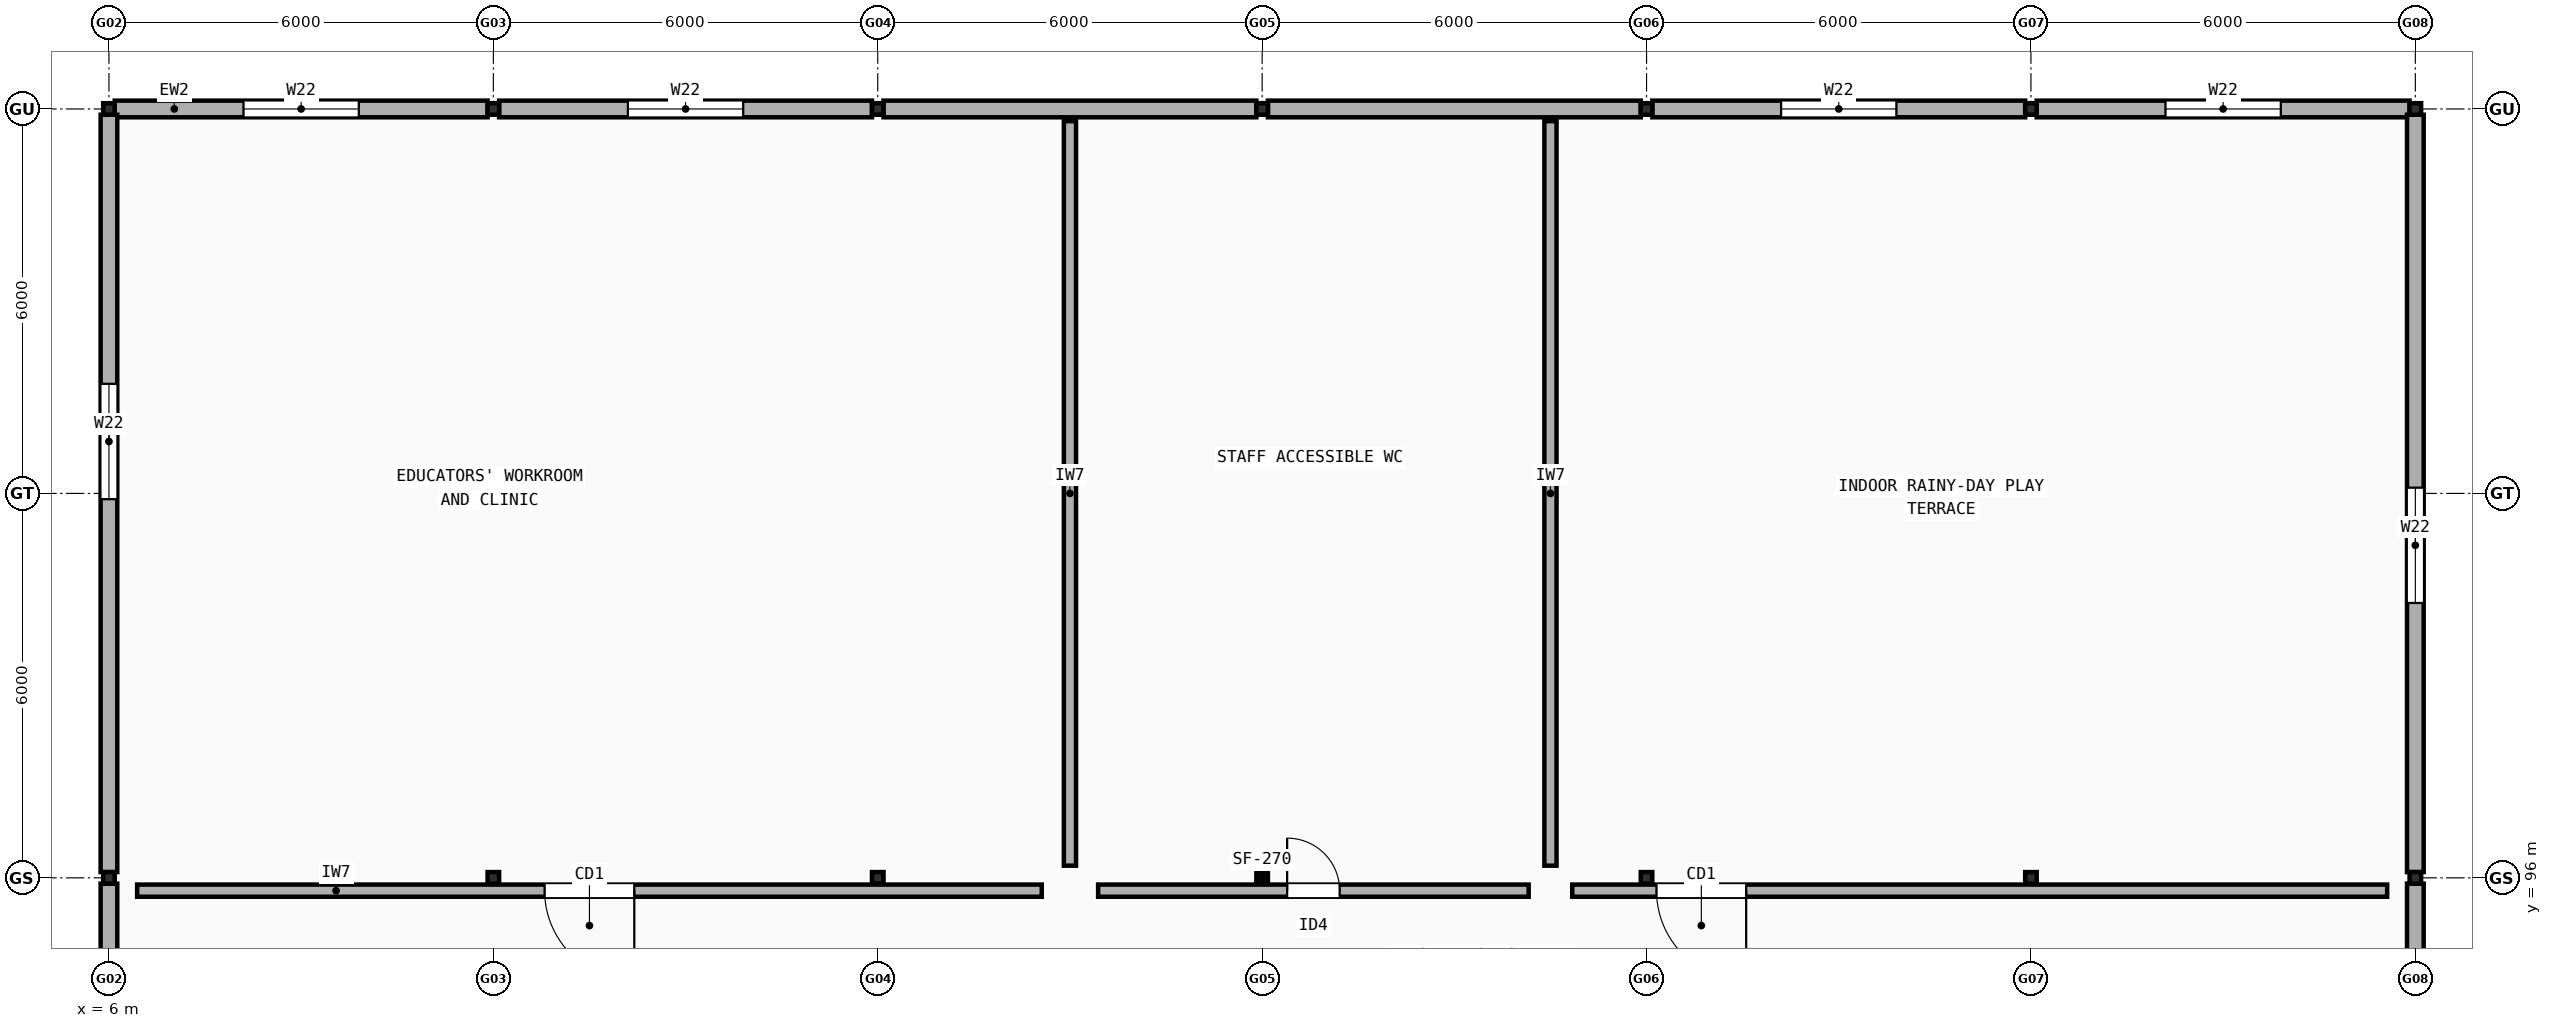
"""IFC4 building model, lengths in metres.
Left out: names, types, materials, properties, quantities, classifications, styles, units other than length and angle.
Written with IfcOpenShell. Run it as: python <this file> out.ifc"""

import sys

from ifc_helpers import new_model, si_unit, direction, frame, frame_2d, origin, origin_2d, place, context, subcontext, project, spatial, rectangle, hollow_rectangle, extrude, element, fill, save


model = new_model("IFC4")
c1 = context("Model", 3, precision=1e-05, world=origin(), true_north=direction((0.0, 1.0)))
c2 = subcontext(c1, "Body", "Model", "MODEL_VIEW")
j1 = project(units=[si_unit("LENGTHUNIT", "METRE"), si_unit("PLANEANGLEUNIT", "RADIAN")], contexts=[c1])
p1 = place(None, origin())
s1 = spatial("IfcSite", under=j1, at=p1, CompositionType="ELEMENT")
p2 = place(p1, origin())
s2 = spatial("IfcBuilding", under=s1, at=p2, CompositionType="ELEMENT")
p3 = place(p2, frame((0.0, 0.0, 4.5)))
s3 = spatial("IfcBuildingStorey", under=s2, at=p3, CompositionType="ELEMENT", Elevation=4.5)
p4 = place(p3, frame((6.0, 96.0, 0.0), z_axis=(0.0, 0.0, 1.0), x_axis=(1.0, 0.0, 0.0)))
e1 = element("IfcColumn", 1, at=p4, inside=s3, PredefinedType="COLUMN", context=c2, shape_type="SweptSolid", body=[
    extrude(hollow_rectangle(XDim=0.18, YDim=0.18, WallThickness=0.01, InnerFilletRadius=0.01, OuterFilletRadius=0.02, at=origin_2d()), origin(), (0.0, 0.0, 1.0), 5.276),
])
p5 = place(p3, frame((6.0, 108.0, 0.0), z_axis=(0.0, 0.0, 1.0), x_axis=(1.0, 0.0, 0.0)))
e2 = element("IfcColumn", 2, at=p5, inside=s3, PredefinedType="COLUMN", context=c2, shape_type="SweptSolid", body=[
    extrude(hollow_rectangle(XDim=0.18, YDim=0.18, WallThickness=0.01, InnerFilletRadius=0.01, OuterFilletRadius=0.02, at=origin_2d()), origin(), (0.0, 0.0, 1.0), 7.392),
])
p6 = place(p3, frame((12.0, 96.0, 0.0), z_axis=(0.0, 0.0, 1.0), x_axis=(1.0, 0.0, 0.0)))
e3 = element("IfcColumn", 3, at=p6, inside=s3, PredefinedType="COLUMN", context=c2, shape_type="SweptSolid", body=[
    extrude(hollow_rectangle(XDim=0.18, YDim=0.18, WallThickness=0.01, InnerFilletRadius=0.01, OuterFilletRadius=0.02, at=origin_2d()), origin(), (0.0, 0.0, 1.0), 5.276),
])
p7 = place(p3, frame((12.0, 108.0, 0.0), z_axis=(0.0, 0.0, 1.0), x_axis=(1.0, 0.0, 0.0)))
e4 = element("IfcColumn", 4, at=p7, inside=s3, PredefinedType="COLUMN", context=c2, shape_type="SweptSolid", body=[
    extrude(hollow_rectangle(XDim=0.18, YDim=0.18, WallThickness=0.01, InnerFilletRadius=0.01, OuterFilletRadius=0.02, at=origin_2d()), origin(), (0.0, 0.0, 1.0), 7.392),
])
p8 = place(p3, frame((18.0, 96.0, 0.0), z_axis=(0.0, 0.0, 1.0), x_axis=(1.0, 0.0, 0.0)))
e5 = element("IfcColumn", 5, at=p8, inside=s3, PredefinedType="COLUMN", context=c2, shape_type="SweptSolid", body=[
    extrude(hollow_rectangle(XDim=0.18, YDim=0.18, WallThickness=0.01, InnerFilletRadius=0.01, OuterFilletRadius=0.02, at=origin_2d()), origin(), (0.0, 0.0, 1.0), 5.276),
])
p9 = place(p3, frame((18.0, 108.0, 0.0), z_axis=(0.0, 0.0, 1.0), x_axis=(1.0, 0.0, 0.0)))
e6 = element("IfcColumn", 6, at=p9, inside=s3, PredefinedType="COLUMN", context=c2, shape_type="SweptSolid", body=[
    extrude(hollow_rectangle(XDim=0.18, YDim=0.18, WallThickness=0.01, InnerFilletRadius=0.01, OuterFilletRadius=0.02, at=origin_2d()), origin(), (0.0, 0.0, 1.0), 7.392),
])
p10 = place(p3, frame((24.0, 96.0, 0.0), z_axis=(0.0, 0.0, 1.0), x_axis=(1.0, 0.0, 0.0)))
e7 = element("IfcColumn", 7, at=p10, inside=s3, PredefinedType="COLUMN", context=c2, shape_type="SweptSolid", body=[
    extrude(hollow_rectangle(XDim=0.18, YDim=0.18, WallThickness=0.01, InnerFilletRadius=0.01, OuterFilletRadius=0.02, at=origin_2d()), origin(), (0.0, 0.0, 1.0), 5.276),
])
p11 = place(p3, frame((24.0, 108.0, 0.0), z_axis=(0.0, 0.0, 1.0), x_axis=(1.0, 0.0, 0.0)))
e8 = element("IfcColumn", 8, at=p11, inside=s3, PredefinedType="COLUMN", context=c2, shape_type="SweptSolid", body=[
    extrude(hollow_rectangle(XDim=0.18, YDim=0.18, WallThickness=0.01, InnerFilletRadius=0.01, OuterFilletRadius=0.02, at=origin_2d()), origin(), (0.0, 0.0, 1.0), 7.392),
])
p12 = place(p3, frame((30.0, 96.0, 0.0), z_axis=(0.0, 0.0, 1.0), x_axis=(1.0, 0.0, 0.0)))
e9 = element("IfcColumn", 9, at=p12, inside=s3, PredefinedType="COLUMN", context=c2, shape_type="SweptSolid", body=[
    extrude(hollow_rectangle(XDim=0.18, YDim=0.18, WallThickness=0.01, InnerFilletRadius=0.01, OuterFilletRadius=0.02, at=origin_2d()), origin(), (0.0, 0.0, 1.0), 5.276),
])
p13 = place(p3, frame((30.0, 108.0, 0.0), z_axis=(0.0, 0.0, 1.0), x_axis=(1.0, 0.0, 0.0)))
e10 = element("IfcColumn", 10, at=p13, inside=s3, PredefinedType="COLUMN", context=c2, shape_type="SweptSolid", body=[
    extrude(hollow_rectangle(XDim=0.18, YDim=0.18, WallThickness=0.01, InnerFilletRadius=0.01, OuterFilletRadius=0.02, at=origin_2d()), origin(), (0.0, 0.0, 1.0), 7.392),
])
p14 = place(p3, frame((36.0, 96.0, 0.0), z_axis=(0.0, 0.0, 1.0), x_axis=(1.0, 0.0, 0.0)))
e11 = element("IfcColumn", 11, at=p14, inside=s3, PredefinedType="COLUMN", context=c2, shape_type="SweptSolid", body=[
    extrude(hollow_rectangle(XDim=0.18, YDim=0.18, WallThickness=0.01, InnerFilletRadius=0.01, OuterFilletRadius=0.02, at=origin_2d()), origin(), (0.0, 0.0, 1.0), 5.276),
])
p15 = place(p3, frame((36.0, 108.0, 0.0), z_axis=(0.0, 0.0, 1.0), x_axis=(1.0, 0.0, 0.0)))
e12 = element("IfcColumn", 12, at=p15, inside=s3, PredefinedType="COLUMN", context=c2, shape_type="SweptSolid", body=[
    extrude(hollow_rectangle(XDim=0.18, YDim=0.18, WallThickness=0.01, InnerFilletRadius=0.01, OuterFilletRadius=0.02, at=origin_2d()), origin(), (0.0, 0.0, 1.0), 7.392),
])
p16 = place(p3, frame((42.0, 96.0, 0.0), z_axis=(0.0, 0.0, 1.0), x_axis=(1.0, 0.0, 0.0)))
e13 = element("IfcColumn", 13, at=p16, inside=s3, PredefinedType="COLUMN", context=c2, shape_type="SweptSolid", body=[
    extrude(hollow_rectangle(XDim=0.18, YDim=0.18, WallThickness=0.01, InnerFilletRadius=0.01, OuterFilletRadius=0.02, at=origin_2d()), origin(), (0.0, 0.0, 1.0), 5.276),
])
p17 = place(p3, frame((42.0, 108.0, 0.0), z_axis=(0.0, 0.0, 1.0), x_axis=(1.0, 0.0, 0.0)))
e14 = element("IfcColumn", 14, at=p17, inside=s3, PredefinedType="COLUMN", context=c2, shape_type="SweptSolid", body=[
    extrude(hollow_rectangle(XDim=0.18, YDim=0.18, WallThickness=0.01, InnerFilletRadius=0.01, OuterFilletRadius=0.02, at=origin_2d()), origin(), (0.0, 0.0, 1.0), 7.392),
])
p18 = place(p3, frame((11.91, 108.0, 0.0), z_axis=(0.0, 0.0, 1.0), x_axis=(-1.0, 0.0, 0.0)))
e15 = element("IfcWall", 15, at=p18, inside=s3, PredefinedType="STANDARD", context=c2, shape_type="SweptSolid", body=[
    extrude(rectangle(XDim=5.82, YDim=0.26, at=frame_2d((2.91, 0.0))), origin(), (0.0, 0.0, 1.0), 2.7),
])
p19 = place(p18, frame((2.01, 0.0, 0.85)))
e16 = element("IfcOpeningElement", 16, at=p19, cuts=e15, PredefinedType="OPENING", context=c2, shape_type="SweptSolid", body=[
    extrude(rectangle(XDim=1.8, YDim=1.45, at=frame_2d((0.9, 0.725))), frame((0.0, 0.14, 0.0), z_axis=(0.0, -1.0, 0.0), x_axis=(1.0, 0.0, 0.0)), (0.0, 0.0, 1.0), 0.28),
])
p20 = place(p3, frame((17.91, 108.0, 0.0), z_axis=(0.0, 0.0, 1.0), x_axis=(-1.0, 0.0, 0.0)))
e17 = element("IfcWall", 17, at=p20, inside=s3, PredefinedType="STANDARD", context=c2, shape_type="SweptSolid", body=[
    extrude(rectangle(XDim=5.82, YDim=0.26, at=frame_2d((2.91, 0.0))), origin(), (0.0, 0.0, 1.0), 2.7),
])
p21 = place(p20, frame((2.01, 0.0, 0.85)))
e18 = element("IfcOpeningElement", 18, at=p21, cuts=e17, PredefinedType="OPENING", context=c2, shape_type="SweptSolid", body=[
    extrude(rectangle(XDim=1.8, YDim=1.45, at=frame_2d((0.9, 0.725))), frame((0.0, 0.14, 0.0), z_axis=(0.0, -1.0, 0.0), x_axis=(1.0, 0.0, 0.0)), (0.0, 0.0, 1.0), 0.28),
])
for number, where, z_axis, x_axis in (
    (19, (23.91, 108.0, 0.0), (0.0, 0.0, 1.0), (-1.0, 0.0, 0.0)),
    (20, (29.91, 108.0, 0.0), (0.0, 0.0, 1.0), (-1.0, 0.0, 0.0)),
):
    element("IfcWall", number, at=place(p3, frame(where, z_axis=z_axis, x_axis=x_axis)), inside=s3, PredefinedType="STANDARD", context=c2, shape_type="SweptSolid", body=[
        extrude(rectangle(XDim=5.82, YDim=0.26, at=frame_2d((2.91, 0.0))), origin(), (0.0, 0.0, 1.0), 2.7),
    ])
p22 = place(p3, frame((35.91, 108.0, 0.0), z_axis=(0.0, 0.0, 1.0), x_axis=(-1.0, 0.0, 0.0)))
e21 = element("IfcWall", 21, at=p22, inside=s3, PredefinedType="STANDARD", context=c2, shape_type="SweptSolid", body=[
    extrude(rectangle(XDim=5.82, YDim=0.26, at=frame_2d((2.91, 0.0))), origin(), (0.0, 0.0, 1.0), 2.7),
])
p23 = place(p22, frame((2.01, 0.0, 0.85)))
e22 = element("IfcOpeningElement", 22, at=p23, cuts=e21, PredefinedType="OPENING", context=c2, shape_type="SweptSolid", body=[
    extrude(rectangle(XDim=1.8, YDim=1.45, at=frame_2d((0.9, 0.725))), frame((0.0, 0.14, 0.0), z_axis=(0.0, -1.0, 0.0), x_axis=(1.0, 0.0, 0.0)), (0.0, 0.0, 1.0), 0.28),
])
p24 = place(p3, frame((41.91, 108.0, 0.0), z_axis=(0.0, 0.0, 1.0), x_axis=(-1.0, 0.0, 0.0)))
e23 = element("IfcWall", 23, at=p24, inside=s3, PredefinedType="STANDARD", context=c2, shape_type="SweptSolid", body=[
    extrude(rectangle(XDim=5.82, YDim=0.26, at=frame_2d((2.91, 0.0))), origin(), (0.0, 0.0, 1.0), 2.7),
])
p25 = place(p24, frame((2.01, 0.0, 0.85)))
e24 = element("IfcOpeningElement", 24, at=p25, cuts=e23, PredefinedType="OPENING", context=c2, shape_type="SweptSolid", body=[
    extrude(rectangle(XDim=1.8, YDim=1.45, at=frame_2d((0.9, 0.725))), frame((0.0, 0.14, 0.0), z_axis=(0.0, -1.0, 0.0), x_axis=(1.0, 0.0, 0.0)), (0.0, 0.0, 1.0), 0.28),
])
p26 = place(p3, frame((6.0, 95.91, 0.0), z_axis=(0.0, 0.0, 1.0), x_axis=(0.0, -1.0, 0.0)))
e25 = element("IfcWall", 25, at=p26, inside=s3, PredefinedType="STANDARD", context=c2, shape_type="SweptSolid", body=[
    extrude(rectangle(XDim=11.82, YDim=0.26, at=frame_2d((5.91, 0.0))), origin(), (0.0, 0.0, 1.0), 2.7),
])
p27 = place(p26, frame((4.2, 0.0, 0.85)))
e26 = element("IfcOpeningElement", 26, at=p27, cuts=e25, PredefinedType="OPENING", context=c2, shape_type="SweptSolid", body=[
    extrude(rectangle(XDim=1.8, YDim=1.45, at=frame_2d((0.9, 0.725))), frame((0.0, 0.14, 0.0), z_axis=(0.0, -1.0, 0.0), x_axis=(1.0, 0.0, 0.0)), (0.0, 0.0, 1.0), 0.28),
])
p28 = place(p3, frame((42.0, 84.09, 0.0), z_axis=(0.0, 0.0, 1.0), x_axis=(0.0, 1.0, 0.0)))
e27 = element("IfcWall", 27, at=p28, inside=s3, PredefinedType="STANDARD", context=c2, shape_type="SweptSolid", body=[
    extrude(rectangle(XDim=11.82, YDim=0.26, at=frame_2d((5.91, 0.0))), origin(), (0.0, 0.0, 1.0), 2.7),
])
p29 = place(p28, frame((4.2, 0.0, 0.85)))
e28 = element("IfcOpeningElement", 28, at=p29, cuts=e27, PredefinedType="OPENING", context=c2, shape_type="SweptSolid", body=[
    extrude(rectangle(XDim=1.8, YDim=1.45, at=frame_2d((0.9, 0.725))), frame((0.0, 0.14, 0.0), z_axis=(0.0, -1.0, 0.0), x_axis=(1.0, 0.0, 0.0)), (0.0, 0.0, 1.0), 0.28),
])
p30 = place(p3, frame((6.0, 107.91, 0.0), z_axis=(0.0, 0.0, 1.0), x_axis=(0.0, -1.0, 0.0)))
e29 = element("IfcWall", 29, at=p30, inside=s3, PredefinedType="STANDARD", context=c2, shape_type="SweptSolid", body=[
    extrude(rectangle(XDim=11.82, YDim=0.26, at=frame_2d((5.91, 0.0))), origin(), (0.0, 0.0, 1.0), 2.7),
])
p31 = place(p30, frame((4.2, 0.0, 0.85)))
e30 = element("IfcOpeningElement", 30, at=p31, cuts=e29, PredefinedType="OPENING", context=c2, shape_type="SweptSolid", body=[
    extrude(rectangle(XDim=1.8, YDim=1.45, at=frame_2d((0.9, 0.725))), frame((0.0, 0.14, 0.0), z_axis=(0.0, -1.0, 0.0), x_axis=(1.0, 0.0, 0.0)), (0.0, 0.0, 1.0), 0.28),
])
p32 = place(p3, frame((42.0, 96.09, 0.0), z_axis=(0.0, 0.0, 1.0), x_axis=(0.0, 1.0, 0.0)))
e31 = element("IfcWall", 31, at=p32, inside=s3, PredefinedType="STANDARD", context=c2, shape_type="SweptSolid", body=[
    extrude(rectangle(XDim=11.82, YDim=0.26, at=frame_2d((5.91, 0.0))), origin(), (0.0, 0.0, 1.0), 2.7),
])
p33 = place(p32, frame((4.2, 0.0, 0.85)))
e32 = element("IfcOpeningElement", 32, at=p33, cuts=e31, PredefinedType="OPENING", context=c2, shape_type="SweptSolid", body=[
    extrude(rectangle(XDim=1.8, YDim=1.45, at=frame_2d((0.9, 0.725))), frame((0.0, 0.14, 0.0), z_axis=(0.0, -1.0, 0.0), x_axis=(1.0, 0.0, 0.0)), (0.0, 0.0, 1.0), 0.28),
])
p34 = place(p3, frame((6.44, 95.8, 0.0), z_axis=(0.0, 0.0, 1.0), x_axis=(1.0, 0.0, 0.0)))
e33 = element("IfcWall", 33, at=p34, inside=s3, PredefinedType="SOLIDWALL", context=c2, shape_type="SweptSolid", body=[
    extrude(rectangle(XDim=14.12, YDim=0.19, at=frame_2d((7.06, 0.0))), origin(), (0.0, 0.0, 1.0), 2.872),
])
p35 = place(p34, frame((6.36, 0.0, 0.0)))
e34 = element("IfcOpeningElement", 34, at=p35, cuts=e33, PredefinedType="OPENING", context=c2, shape_type="SweptSolid", body=[
    extrude(rectangle(XDim=1.4, YDim=2.15, at=frame_2d((0.7, 1.075))), frame((0.0, 0.105, 0.0), z_axis=(0.0, -1.0, 0.0), x_axis=(1.0, 0.0, 0.0)), (0.0, 0.0, 1.0), 0.21),
])
p36 = place(p3, frame((21.0, 96.19, 0.0), z_axis=(0.0, 0.0, 1.0), x_axis=(0.0, 1.0, 0.0)))
e35 = element("IfcWall", 35, at=p36, inside=s3, PredefinedType="SOLIDWALL", context=c2, shape_type="SweptSolid", body=[
    extrude(rectangle(XDim=11.62, YDim=0.19, at=frame_2d((5.81, 0.0))), origin(), (0.0, 0.0, 1.0), 2.945),
])
p37 = place(p3, frame((21.44, 95.8, 0.0), z_axis=(0.0, 0.0, 1.0), x_axis=(1.0, 0.0, 0.0)))
e36 = element("IfcWall", 36, at=p37, inside=s3, PredefinedType="SOLIDWALL", context=c2, shape_type="SweptSolid", body=[
    extrude(rectangle(XDim=6.72, YDim=0.19, at=frame_2d((3.36, 0.0))), origin(), (0.0, 0.0, 1.0), 2.872),
])
p38 = place(p37, frame((2.95, 0.0, 0.0)))
e37 = element("IfcOpeningElement", 37, at=p38, cuts=e36, PredefinedType="OPENING", context=c2, shape_type="SweptSolid", body=[
    extrude(rectangle(XDim=0.82, YDim=2.08, at=frame_2d((0.41, 1.04))), frame((0.0, 0.105, 0.0), z_axis=(0.0, -1.0, 0.0), x_axis=(1.0, 0.0, 0.0)), (0.0, 0.0, 1.0), 0.21),
])
p39 = place(p3, frame((28.5, 96.19, 0.0), z_axis=(0.0, 0.0, 1.0), x_axis=(0.0, 1.0, 0.0)))
e38 = element("IfcWall", 38, at=p39, inside=s3, PredefinedType="SOLIDWALL", context=c2, shape_type="SweptSolid", body=[
    extrude(rectangle(XDim=11.62, YDim=0.19, at=frame_2d((5.81, 0.0))), origin(), (0.0, 0.0, 1.0), 2.945),
])
p40 = place(p3, frame((28.84, 95.8, 0.0), z_axis=(0.0, 0.0, 1.0), x_axis=(1.0, 0.0, 0.0)))
e39 = element("IfcWall", 39, at=p40, inside=s3, PredefinedType="SOLIDWALL", context=c2, shape_type="SweptSolid", body=[
    extrude(rectangle(XDim=12.72, YDim=0.19, at=frame_2d((6.36, 0.0))), origin(), (0.0, 0.0, 1.0), 2.872),
])
p41 = place(p40, frame((1.315, 0.0, 0.0)))
e40 = element("IfcOpeningElement", 40, at=p41, cuts=e39, PredefinedType="OPENING", context=c2, shape_type="SweptSolid", body=[
    extrude(rectangle(XDim=1.4, YDim=2.15, at=frame_2d((0.7, 1.075))), frame((0.0, 0.105, 0.0), z_axis=(0.0, -1.0, 0.0), x_axis=(1.0, 0.0, 0.0)), (0.0, 0.0, 1.0), 0.21),
])
p42 = place(p19, origin())
e41 = element("IfcWindow", 41, at=p42, inside=s3, PartitioningType="SINGLE_PANEL", PredefinedType="WINDOW", context=c2, shape_type="SweptSolid", body=[
    extrude(rectangle(XDim=1.8, YDim=1.45, at=frame_2d((0.9, 0.725))), frame((0.0, 0.03, 0.0), z_axis=(0.0, -1.0, 0.0), x_axis=(1.0, 0.0, 0.0)), (0.0, 0.0, 1.0), 0.06),
])
fill(e16, e41)
p43 = place(p21, origin())
e42 = element("IfcWindow", 42, at=p43, inside=s3, PartitioningType="SINGLE_PANEL", PredefinedType="WINDOW", context=c2, shape_type="SweptSolid", body=[
    extrude(rectangle(XDim=1.8, YDim=1.45, at=frame_2d((0.9, 0.725))), frame((0.0, 0.03, 0.0), z_axis=(0.0, -1.0, 0.0), x_axis=(1.0, 0.0, 0.0)), (0.0, 0.0, 1.0), 0.06),
])
fill(e18, e42)
p44 = place(p23, origin())
e43 = element("IfcWindow", 43, at=p44, inside=s3, PartitioningType="SINGLE_PANEL", PredefinedType="WINDOW", context=c2, shape_type="SweptSolid", body=[
    extrude(rectangle(XDim=1.8, YDim=1.45, at=frame_2d((0.9, 0.725))), frame((0.0, 0.03, 0.0), z_axis=(0.0, -1.0, 0.0), x_axis=(1.0, 0.0, 0.0)), (0.0, 0.0, 1.0), 0.06),
])
fill(e22, e43)
p45 = place(p25, origin())
e44 = element("IfcWindow", 44, at=p45, inside=s3, PartitioningType="SINGLE_PANEL", PredefinedType="WINDOW", context=c2, shape_type="SweptSolid", body=[
    extrude(rectangle(XDim=1.8, YDim=1.45, at=frame_2d((0.9, 0.725))), frame((0.0, 0.03, 0.0), z_axis=(0.0, -1.0, 0.0), x_axis=(1.0, 0.0, 0.0)), (0.0, 0.0, 1.0), 0.06),
])
fill(e24, e44)
p46 = place(p31, origin())
e45 = element("IfcWindow", 45, at=p46, inside=s3, PartitioningType="SINGLE_PANEL", PredefinedType="WINDOW", context=c2, shape_type="SweptSolid", body=[
    extrude(rectangle(XDim=1.8, YDim=1.45, at=frame_2d((0.9, 0.725))), frame((0.0, 0.03, 0.0), z_axis=(0.0, -1.0, 0.0), x_axis=(1.0, 0.0, 0.0)), (0.0, 0.0, 1.0), 0.06),
])
fill(e30, e45)
p47 = place(p33, origin())
e46 = element("IfcWindow", 46, at=p47, inside=s3, PartitioningType="SINGLE_PANEL", PredefinedType="WINDOW", context=c2, shape_type="SweptSolid", body=[
    extrude(rectangle(XDim=1.8, YDim=1.45, at=frame_2d((0.9, 0.725))), frame((0.0, 0.03, 0.0), z_axis=(0.0, -1.0, 0.0), x_axis=(1.0, 0.0, 0.0)), (0.0, 0.0, 1.0), 0.06),
])
fill(e32, e46)
p48 = place(p35, origin())
e47 = element("IfcDoor", 47, at=p48, inside=s3, OperationType="SINGLE_SWING_RIGHT", PredefinedType="DOOR", context=c2, shape_type="SweptSolid", body=[
    extrude(rectangle(XDim=1.4, YDim=2.15, at=frame_2d((0.7, 1.075))), frame((0.0, 0.025, 0.0), z_axis=(0.0, -1.0, 0.0), x_axis=(1.0, 0.0, 0.0)), (0.0, 0.0, 1.0), 0.05),
])
fill(e34, e47)
p49 = place(p38, origin())
e48 = element("IfcDoor", 48, at=p49, inside=s3, OperationType="SINGLE_SWING_LEFT", PredefinedType="DOOR", context=c2, shape_type="SweptSolid", body=[
    extrude(rectangle(XDim=0.82, YDim=2.08, at=frame_2d((0.41, 1.04))), frame((0.0, 0.025, 0.0), z_axis=(0.0, -1.0, 0.0), x_axis=(1.0, 0.0, 0.0)), (0.0, 0.0, 1.0), 0.05),
])
fill(e37, e48)
p50 = place(p41, origin())
e49 = element("IfcDoor", 49, at=p50, inside=s3, OperationType="SINGLE_SWING_RIGHT", PredefinedType="DOOR", context=c2, shape_type="SweptSolid", body=[
    extrude(rectangle(XDim=1.4, YDim=2.15, at=frame_2d((0.7, 1.075))), frame((0.0, 0.025, 0.0), z_axis=(0.0, -1.0, 0.0), x_axis=(1.0, 0.0, 0.0)), (0.0, 0.0, 1.0), 0.05),
])
fill(e40, e49)
save(model, sys.argv[1])
